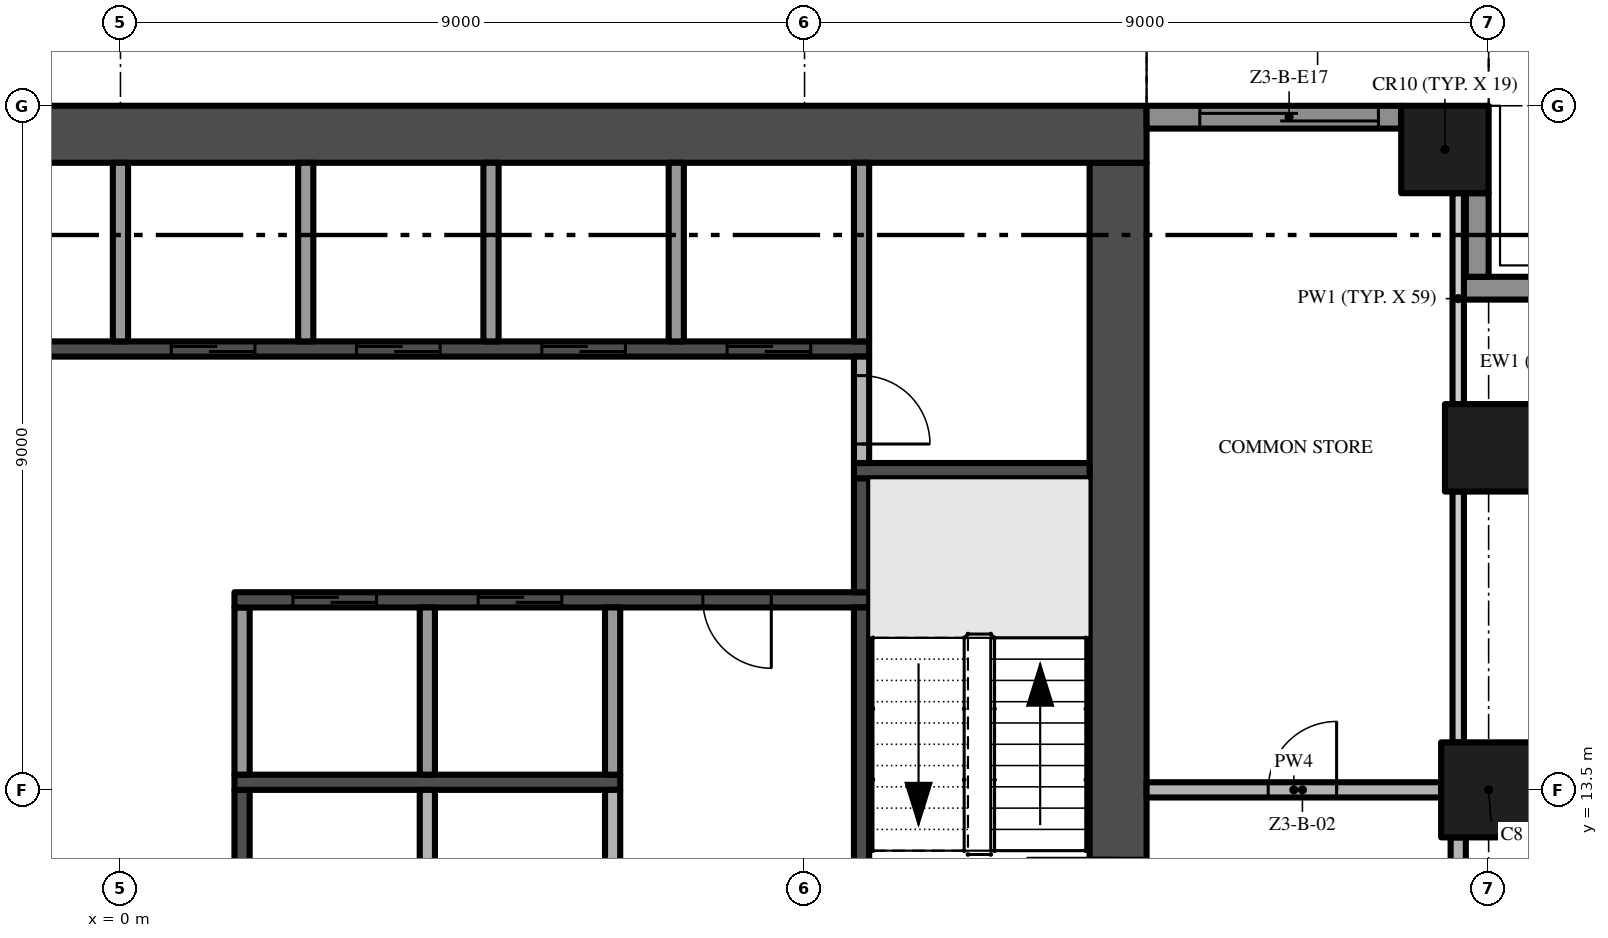
"""IFC4 building model, lengths in metres.
Left out: names, types, materials, properties, quantities, classifications, styles, units other than length and angle.
Written with IfcOpenShell. Run it as: python <this file> out.ifc"""

import sys

from ifc_helpers import new_model, si_unit, direction, frame, frame_2d, origin, origin_2d, place, context, subcontext, project, spatial, rectangle, extrude, element, fill, save


model = new_model("IFC4")
c1 = context("Model", 3, precision=1e-05, world=origin(), true_north=direction((0.0, 1.0)))
c2 = subcontext(c1, "Body", "Model", "MODEL_VIEW")
j1 = project(units=[si_unit("LENGTHUNIT", "METRE"), si_unit("PLANEANGLEUNIT", "RADIAN")], contexts=[c1])
p1 = place(None, origin())
s1 = spatial("IfcSite", under=j1, at=p1, CompositionType="ELEMENT")
p2 = place(p1, origin())
s2 = spatial("IfcBuilding", under=s1, at=p2, CompositionType="ELEMENT")
p3 = place(p2, frame((0.0, 0.0, 144.0)))
s3 = spatial("IfcBuildingStorey", under=s2, at=p3, CompositionType="ELEMENT", Elevation=144.0)
p4 = place(p3, frame((13.125, 5.25, -0.3), z_axis=(0.0, 0.0, 1.0), x_axis=(0.0, 1.0, 0.0)))
e1 = element("IfcWall", 1, at=p4, inside=s3, PredefinedType="SHEAR", context=c2, shape_type="SweptSolid", body=[
    extrude(rectangle(XDim=16.5, YDim=0.75, at=frame_2d((8.25, 0.0))), origin(), (0.0, 0.0, 1.0), 3.8),
])
p5 = place(p4, frame((6.15, 0.0, 0.3)))
e2 = element("IfcOpeningElement", 2, at=p5, cuts=e1, PredefinedType="OPENING", context=c2, shape_type="SweptSolid", body=[
    extrude(rectangle(XDim=1.2, YDim=2.2, at=frame_2d((0.6, 1.1))), frame((0.0, 0.385, 0.0), z_axis=(0.0, -1.0, 0.0), x_axis=(1.0, 0.0, 0.0)), (0.0, 0.0, 1.0), 0.77),
])
p6 = place(p3, frame((13.5, 22.125, -0.3), z_axis=(0.0, 0.0, 1.0), x_axis=(-1.0, 0.0, 0.0)))
e3 = element("IfcWall", 3, at=p6, inside=s3, PredefinedType="SHEAR", context=c2, shape_type="SweptSolid", body=[
    extrude(rectangle(XDim=27.0, YDim=0.75, at=frame_2d((13.5, 0.0))), origin(), (0.0, 0.0, 1.0), 3.8),
])
p7 = place(p3, frame((18.0, 13.5, 0.0), z_axis=(0.0, 0.0, 1.0), x_axis=(1.0, 0.0, 0.0)))
e4 = element("IfcColumn", 4, at=p7, inside=s3, PredefinedType="COLUMN", context=c2, shape_type="SweptSolid", body=[
    extrude(rectangle(XDim=1.25, YDim=1.25, at=origin_2d()), origin(), (0.0, 0.0, 1.0), 3.5),
])
for number, where, z_axis, x_axis in (
    (5, (17.425, 21.925, 0.0), (0.0, 0.0, 1.0), (1.0, 0.0, 0.0)),
    (6, (18.0, 18.0, 0.0), (0.0, 0.0, 1.0), (1.0, 0.0, 0.0)),
):
    element("IfcColumn", number, at=place(p3, frame(where, z_axis=z_axis, x_axis=x_axis)), inside=s3, PredefinedType="COLUMN", context=c2, shape_type="SweptSolid", body=[
        extrude(rectangle(XDim=1.15, YDim=1.15, at=origin_2d()), origin(), (0.0, 0.0, 1.0), 3.5),
    ])
p8 = place(p3, frame((17.6, 20.1, 0.0), z_axis=(0.0, 0.0, 1.0), x_axis=(1.0, 0.0, 0.0)))
e7 = element("IfcWall", 7, at=p8, inside=s3, PredefinedType="SOLIDWALL", context=c2, shape_type="SweptSolid", body=[
    extrude(rectangle(XDim=2.35, YDim=0.3, at=frame_2d((1.175, 0.0))), origin(), (0.0, 0.0, 1.0), 3.5),
])
p9 = place(p3, frame((17.85, 21.35, 0.0), z_axis=(0.0, 0.0, 1.0), x_axis=(0.0, -1.0, 0.0)))
e8 = element("IfcWall", 8, at=p9, inside=s3, PredefinedType="SOLIDWALL", context=c2, shape_type="SweptSolid", body=[
    extrude(rectangle(XDim=1.1, YDim=0.3, at=frame_2d((0.55, 0.0))), origin(), (0.0, 0.0, 1.0), 3.5),
])
p10 = place(p3, frame((13.5, 22.35, 0.0), z_axis=(0.0, 0.0, 1.0), x_axis=(1.0, 0.0, 0.0)))
e9 = element("IfcWall", 9, at=p10, inside=s3, PredefinedType="SOLIDWALL", context=c2, shape_type="SweptSolid", body=[
    extrude(rectangle(XDim=3.35, YDim=0.3, at=frame_2d((1.675, 0.0))), origin(), (0.0, 0.0, 1.0), 3.5),
])
p11 = place(p10, frame((0.7, 0.0, 0.0)))
e10 = element("IfcOpeningElement", 10, at=p11, cuts=e9, PredefinedType="OPENING", context=c2, shape_type="SweptSolid", body=[
    extrude(rectangle(XDim=2.35, YDim=2.4, at=frame_2d((1.175, 1.2))), frame((0.0, 0.16, 0.0), z_axis=(0.0, -1.0, 0.0), x_axis=(1.0, 0.0, 0.0)), (0.0, 0.0, 1.0), 0.32),
])
p12 = place(p3, frame((-9.85, 19.3, 0.0), z_axis=(0.0, 0.0, 1.0), x_axis=(1.0, 0.0, 0.0)))
e11 = element("IfcWall", 11, at=p12, inside=s3, PredefinedType="SHEAR", context=c2, shape_type="SweptSolid", body=[
    extrude(rectangle(XDim=19.7, YDim=0.2, at=frame_2d((9.85, 0.0))), origin(), (0.0, 0.0, 1.0), 3.5),
])
p13 = place(p12, frame((10.519, 0.0, 0.0)))
e12 = element("IfcOpeningElement", 12, at=p13, cuts=e11, PredefinedType="OPENING", context=c2, shape_type="SweptSolid", body=[
    extrude(rectangle(XDim=1.1, YDim=2.1, at=frame_2d((0.55, 1.05))), frame((0.0, 0.11, 0.0), z_axis=(0.0, -1.0, 0.0), x_axis=(1.0, 0.0, 0.0)), (0.0, 0.0, 1.0), 0.22),
])
p14 = place(p12, frame((12.956, 0.0, 0.0)))
e13 = element("IfcOpeningElement", 13, at=p14, cuts=e11, PredefinedType="OPENING", context=c2, shape_type="SweptSolid", body=[
    extrude(rectangle(XDim=1.1, YDim=2.1, at=frame_2d((0.55, 1.05))), frame((0.0, 0.11, 0.0), z_axis=(0.0, -1.0, 0.0), x_axis=(1.0, 0.0, 0.0)), (0.0, 0.0, 1.0), 0.22),
])
p15 = place(p12, frame((15.394, 0.0, 0.0)))
e14 = element("IfcOpeningElement", 14, at=p15, cuts=e11, PredefinedType="OPENING", context=c2, shape_type="SweptSolid", body=[
    extrude(rectangle(XDim=1.1, YDim=2.1, at=frame_2d((0.55, 1.05))), frame((0.0, 0.11, 0.0), z_axis=(0.0, -1.0, 0.0), x_axis=(1.0, 0.0, 0.0)), (0.0, 0.0, 1.0), 0.22),
])
p16 = place(p12, frame((17.831, 0.0, 0.0)))
e15 = element("IfcOpeningElement", 15, at=p16, cuts=e11, PredefinedType="OPENING", context=c2, shape_type="SweptSolid", body=[
    extrude(rectangle(XDim=1.1, YDim=2.1, at=frame_2d((0.55, 1.05))), frame((0.0, 0.11, 0.0), z_axis=(0.0, -1.0, 0.0), x_axis=(1.0, 0.0, 0.0)), (0.0, 0.0, 1.0), 0.22),
])
p17 = place(p12, frame((2.087, 0.0, 0.0)))
e16 = element("IfcOpeningElement", 16, at=p17, cuts=e11, PredefinedType="OPENING", context=c2, shape_type="SweptSolid", body=[
    extrude(rectangle(XDim=0.9, YDim=2.1, at=frame_2d((0.45, 1.05))), frame((0.0, 0.11, 0.0), z_axis=(0.0, -1.0, 0.0), x_axis=(1.0, 0.0, 0.0)), (0.0, 0.0, 1.0), 0.22),
])
p18 = place(p12, frame((6.963, 0.0, 0.0)))
e17 = element("IfcOpeningElement", 17, at=p18, cuts=e11, PredefinedType="OPENING", context=c2, shape_type="SweptSolid", body=[
    extrude(rectangle(XDim=0.9, YDim=2.1, at=frame_2d((0.45, 1.05))), frame((0.0, 0.11, 0.0), z_axis=(0.0, -1.0, 0.0), x_axis=(1.0, 0.0, 0.0)), (0.0, 0.0, 1.0), 0.22),
])
p19 = place(p3, frame((0.0, 19.4, 0.0), z_axis=(0.0, 0.0, 1.0), x_axis=(0.0, 1.0, 0.0)))
e18 = element("IfcWall", 18, at=p19, inside=s3, PredefinedType="PARTITIONING", context=c2, shape_type="SweptSolid", body=[
    extrude(rectangle(XDim=2.35, YDim=0.2, at=frame_2d((1.175, 0.0))), origin(), (0.0, 0.0, 1.0), 3.5),
])
p20 = place(p3, frame((1.6, 13.5, 0.0), z_axis=(0.0, 0.0, 1.0), x_axis=(0.0, -1.0, 0.0)))
e19 = element("IfcWall", 19, at=p20, inside=s3, PredefinedType="SHEAR", context=c2, shape_type="SweptSolid", body=[
    extrude(rectangle(XDim=3.5, YDim=0.2, at=frame_2d((1.75, 0.0))), origin(), (0.0, 0.0, 1.0), 3.5),
])
p21 = place(p20, frame((1.3, 0.0, 0.0)))
e20 = element("IfcOpeningElement", 20, at=p21, cuts=e19, PredefinedType="OPENING", context=c2, shape_type="SweptSolid", body=[
    extrude(rectangle(XDim=0.9, YDim=2.1, at=frame_2d((0.45, 1.05))), frame((0.0, 0.11, 0.0), z_axis=(0.0, -1.0, 0.0), x_axis=(1.0, 0.0, 0.0)), (0.0, 0.0, 1.0), 0.22),
])
p22 = place(p3, frame((1.5, 13.6, 0.0), z_axis=(0.0, 0.0, 1.0), x_axis=(1.0, 0.0, 0.0)))
e21 = element("IfcWall", 21, at=p22, inside=s3, PredefinedType="SHEAR", context=c2, shape_type="SweptSolid", body=[
    extrude(rectangle(XDim=5.075, YDim=0.2, at=frame_2d((2.538, 0.0))), origin(), (0.0, 0.0, 1.0), 3.5),
])
p23 = place(p3, frame((1.6, 13.7, 0.0), z_axis=(0.0, 0.0, 1.0), x_axis=(0.0, 1.0, 0.0)))
e22 = element("IfcWall", 22, at=p23, inside=s3, PredefinedType="PARTITIONING", context=c2, shape_type="SweptSolid", body=[
    extrude(rectangle(XDim=2.2, YDim=0.2, at=frame_2d((1.1, 0.0))), origin(), (0.0, 0.0, 1.0), 3.5),
])
p24 = place(p3, frame((9.85, 16.0, 0.0), z_axis=(0.0, 0.0, 1.0), x_axis=(-1.0, 0.0, 0.0)))
e23 = element("IfcWall", 23, at=p24, inside=s3, PredefinedType="SHEAR", context=c2, shape_type="SweptSolid", body=[
    extrude(rectangle(XDim=8.35, YDim=0.2, at=frame_2d((4.175, 0.0))), origin(), (0.0, 0.0, 1.0), 3.5),
])
p25 = place(p24, frame((6.481, 0.0, 0.0)))
e24 = element("IfcOpeningElement", 24, at=p25, cuts=e23, PredefinedType="OPENING", context=c2, shape_type="SweptSolid", body=[
    extrude(rectangle(XDim=1.1, YDim=2.1, at=frame_2d((0.55, 1.05))), frame((0.0, 0.11, 0.0), z_axis=(0.0, -1.0, 0.0), x_axis=(1.0, 0.0, 0.0)), (0.0, 0.0, 1.0), 0.22),
])
p26 = place(p24, frame((4.044, 0.0, 0.0)))
e25 = element("IfcOpeningElement", 25, at=p26, cuts=e23, PredefinedType="OPENING", context=c2, shape_type="SweptSolid", body=[
    extrude(rectangle(XDim=1.1, YDim=2.1, at=frame_2d((0.55, 1.05))), frame((0.0, 0.11, 0.0), z_axis=(0.0, -1.0, 0.0), x_axis=(1.0, 0.0, 0.0)), (0.0, 0.0, 1.0), 0.22),
])
p27 = place(p24, frame((1.288, 0.0, 0.0)))
e26 = element("IfcOpeningElement", 26, at=p27, cuts=e23, PredefinedType="OPENING", context=c2, shape_type="SweptSolid", body=[
    extrude(rectangle(XDim=0.9, YDim=2.1, at=frame_2d((0.45, 1.05))), frame((0.0, 0.11, 0.0), z_axis=(0.0, -1.0, 0.0), x_axis=(1.0, 0.0, 0.0)), (0.0, 0.0, 1.0), 0.22),
])
p28 = place(p3, frame((2.438, 19.4, 0.0), z_axis=(0.0, 0.0, 1.0), x_axis=(0.0, 1.0, 0.0)))
e27 = element("IfcWall", 27, at=p28, inside=s3, PredefinedType="PARTITIONING", context=c2, shape_type="SweptSolid", body=[
    extrude(rectangle(XDim=2.35, YDim=0.2, at=frame_2d((1.175, 0.0))), origin(), (0.0, 0.0, 1.0), 3.5),
])
p29 = place(p3, frame((4.037, 10.0, 0.0), z_axis=(0.0, 0.0, 1.0), x_axis=(0.0, 1.0, 0.0)))
e28 = element("IfcWall", 28, at=p29, inside=s3, PredefinedType="PARTITIONING", context=c2, shape_type="SweptSolid", body=[
    extrude(rectangle(XDim=3.5, YDim=0.2, at=frame_2d((1.75, 0.0))), origin(), (0.0, 0.0, 1.0), 3.5),
])
p30 = place(p3, frame((4.037, 13.7, 0.0), z_axis=(0.0, 0.0, 1.0), x_axis=(0.0, 1.0, 0.0)))
e29 = element("IfcWall", 29, at=p30, inside=s3, PredefinedType="PARTITIONING", context=c2, shape_type="SweptSolid", body=[
    extrude(rectangle(XDim=2.2, YDim=0.2, at=frame_2d((1.1, 0.0))), origin(), (0.0, 0.0, 1.0), 3.5),
])
p31 = place(p3, frame((4.875, 19.4, 0.0), z_axis=(0.0, 0.0, 1.0), x_axis=(0.0, 1.0, 0.0)))
e30 = element("IfcWall", 30, at=p31, inside=s3, PredefinedType="PARTITIONING", context=c2, shape_type="SweptSolid", body=[
    extrude(rectangle(XDim=2.35, YDim=0.2, at=frame_2d((1.175, 0.0))), origin(), (0.0, 0.0, 1.0), 3.5),
])
p32 = place(p3, frame((6.475, 12.3, 0.0), z_axis=(0.0, 0.0, 1.0), x_axis=(0.0, 1.0, 0.0)))
e31 = element("IfcWall", 31, at=p32, inside=s3, PredefinedType="PARTITIONING", context=c2, shape_type="SweptSolid", body=[
    extrude(rectangle(XDim=1.2, YDim=0.2, at=frame_2d((0.6, 0.0))), origin(), (0.0, 0.0, 1.0), 3.5),
])
p33 = place(p3, frame((6.475, 13.7, 0.0), z_axis=(0.0, 0.0, 1.0), x_axis=(0.0, 1.0, 0.0)))
e32 = element("IfcWall", 32, at=p33, inside=s3, PredefinedType="PARTITIONING", context=c2, shape_type="SweptSolid", body=[
    extrude(rectangle(XDim=2.2, YDim=0.2, at=frame_2d((1.1, 0.0))), origin(), (0.0, 0.0, 1.0), 3.5),
])
p34 = place(p3, frame((7.312, 19.4, 0.0), z_axis=(0.0, 0.0, 1.0), x_axis=(0.0, 1.0, 0.0)))
e33 = element("IfcWall", 33, at=p34, inside=s3, PredefinedType="PARTITIONING", context=c2, shape_type="SweptSolid", body=[
    extrude(rectangle(XDim=2.35, YDim=0.2, at=frame_2d((1.175, 0.0))), origin(), (0.0, 0.0, 1.0), 3.5),
])
p35 = place(p3, frame((9.75, 12.3, 0.0), z_axis=(0.0, 0.0, 1.0), x_axis=(0.0, 1.0, 0.0)))
e34 = element("IfcWall", 34, at=p35, inside=s3, PredefinedType="SHEAR", context=c2, shape_type="SweptSolid", body=[
    extrude(rectangle(XDim=3.6, YDim=0.2, at=frame_2d((1.8, 0.0))), origin(), (0.0, 0.0, 1.0), 3.5),
])
p36 = place(p3, frame((9.75, 16.1, 0.0), z_axis=(0.0, 0.0, 1.0), x_axis=(0.0, 1.0, 0.0)))
e35 = element("IfcWall", 35, at=p36, inside=s3, PredefinedType="SHEAR", context=c2, shape_type="SweptSolid", body=[
    extrude(rectangle(XDim=1.5, YDim=0.2, at=frame_2d((0.75, 0.0))), origin(), (0.0, 0.0, 1.0), 3.5),
])
p37 = place(p3, frame((9.65, 17.7, 0.0), z_axis=(0.0, 0.0, 1.0), x_axis=(1.0, 0.0, 0.0)))
e36 = element("IfcWall", 36, at=p37, inside=s3, PredefinedType="SHEAR", context=c2, shape_type="SweptSolid", body=[
    extrude(rectangle(XDim=3.1, YDim=0.2, at=frame_2d((1.55, 0.0))), origin(), (0.0, 0.0, 1.0), 3.5),
])
p38 = place(p3, frame((9.75, 19.2, 0.0), z_axis=(0.0, 0.0, 1.0), x_axis=(0.0, -1.0, 0.0)))
e37 = element("IfcWall", 37, at=p38, inside=s3, PredefinedType="PARTITIONING", context=c2, shape_type="SweptSolid", body=[
    extrude(rectangle(XDim=1.4, YDim=0.2, at=frame_2d((0.7, 0.0))), origin(), (0.0, 0.0, 1.0), 3.5),
])
p39 = place(p38, frame((0.25, 0.0, 0.0)))
e38 = element("IfcOpeningElement", 38, at=p39, cuts=e37, PredefinedType="OPENING", context=c2, shape_type="SweptSolid", body=[
    extrude(rectangle(XDim=0.9, YDim=2.1, at=frame_2d((0.45, 1.05))), frame((0.0, 0.11, 0.0), z_axis=(0.0, -1.0, 0.0), x_axis=(1.0, 0.0, 0.0)), (0.0, 0.0, 1.0), 0.22),
])
p40 = place(p3, frame((9.75, 19.4, 0.0), z_axis=(0.0, 0.0, 1.0), x_axis=(0.0, 1.0, 0.0)))
e39 = element("IfcWall", 39, at=p40, inside=s3, PredefinedType="PARTITIONING", context=c2, shape_type="SweptSolid", body=[
    extrude(rectangle(XDim=2.35, YDim=0.2, at=frame_2d((1.175, 0.0))), origin(), (0.0, 0.0, 1.0), 3.5),
])
p41 = place(p3, frame((13.5, 13.5, 0.0), z_axis=(0.0, 0.0, 1.0), x_axis=(1.0, 0.0, 0.0)))
e40 = element("IfcWall", 40, at=p41, inside=s3, PredefinedType="PARTITIONING", context=c2, shape_type="SweptSolid", body=[
    extrude(rectangle(XDim=3.875, YDim=0.2, at=frame_2d((1.938, 0.0))), origin(), (0.0, 0.0, 1.0), 3.5),
])
p42 = place(p41, frame((1.6, 0.0, 0.0)))
e41 = element("IfcOpeningElement", 41, at=p42, cuts=e40, PredefinedType="OPENING", context=c2, shape_type="SweptSolid", body=[
    extrude(rectangle(XDim=0.9, YDim=2.1, at=frame_2d((0.45, 1.05))), frame((0.0, 0.11, 0.0), z_axis=(0.0, -1.0, 0.0), x_axis=(1.0, 0.0, 0.0)), (0.0, 0.0, 1.0), 0.22),
])
p43 = place(p3, frame((17.6, 12.875, 0.0), z_axis=(0.0, 0.0, 1.0), x_axis=(0.0, -1.0, 0.0)))
e42 = element("IfcWall", 42, at=p43, inside=s3, PredefinedType="PARTITIONING", context=c2, shape_type="SweptSolid", body=[
    extrude(rectangle(XDim=7.75, YDim=0.2, at=frame_2d((3.875, 0.0))), origin(), (0.0, 0.0, 1.0), 3.5),
])
p44 = place(p43, frame((5.55, 0.0, 0.0)))
e43 = element("IfcOpeningElement", 43, at=p44, cuts=e42, PredefinedType="OPENING", context=c2, shape_type="SweptSolid", body=[
    extrude(rectangle(XDim=1.2, YDim=2.4, at=frame_2d((0.6, 1.2))), frame((0.0, 0.11, 0.0), z_axis=(0.0, -1.0, 0.0), x_axis=(1.0, 0.0, 0.0)), (0.0, 0.0, 1.0), 0.22),
])
p45 = place(p3, frame((17.6, 14.125, 0.0), z_axis=(0.0, 0.0, 1.0), x_axis=(0.0, 1.0, 0.0)))
e44 = element("IfcWall", 44, at=p45, inside=s3, PredefinedType="PARTITIONING", context=c2, shape_type="SweptSolid", body=[
    extrude(rectangle(XDim=3.3, YDim=0.15, at=frame_2d((1.65, 0.0))), origin(), (0.0, 0.0, 1.0), 3.5),
])
p46 = place(p3, frame((17.6, 18.575, 0.0), z_axis=(0.0, 0.0, 1.0), x_axis=(0.0, 1.0, 0.0)))
e45 = element("IfcWall", 45, at=p46, inside=s3, PredefinedType="PARTITIONING", context=c2, shape_type="SweptSolid", body=[
    extrude(rectangle(XDim=2.775, YDim=0.15, at=frame_2d((1.387, 0.0))), origin(), (0.0, 0.0, 1.0), 3.5),
])
p47 = place(p11, origin())
e46 = element("IfcDoor", 46, at=p47, inside=s3, OperationType="SINGLE_SWING_LEFT", PredefinedType="DOOR", context=c2, shape_type="SweptSolid", body=[
    extrude(rectangle(XDim=2.35, YDim=2.4, at=frame_2d((1.175, 1.2))), frame((0.0, 0.025, 0.0), z_axis=(0.0, -1.0, 0.0), x_axis=(1.0, 0.0, 0.0)), (0.0, 0.0, 1.0), 0.05),
])
fill(e10, e46)
p48 = place(p13, origin())
e47 = element("IfcDoor", 47, at=p48, inside=s3, OperationType="SLIDING_TO_RIGHT", PredefinedType="DOOR", context=c2, shape_type="SweptSolid", body=[
    extrude(rectangle(XDim=1.1, YDim=2.1, at=frame_2d((0.55, 1.05))), frame((0.0, 0.025, 0.0), z_axis=(0.0, -1.0, 0.0), x_axis=(1.0, 0.0, 0.0)), (0.0, 0.0, 1.0), 0.05),
])
fill(e12, e47)
p49 = place(p14, origin())
e48 = element("IfcDoor", 48, at=p49, inside=s3, OperationType="SLIDING_TO_RIGHT", PredefinedType="DOOR", context=c2, shape_type="SweptSolid", body=[
    extrude(rectangle(XDim=1.1, YDim=2.1, at=frame_2d((0.55, 1.05))), frame((0.0, 0.025, 0.0), z_axis=(0.0, -1.0, 0.0), x_axis=(1.0, 0.0, 0.0)), (0.0, 0.0, 1.0), 0.05),
])
fill(e13, e48)
p50 = place(p15, origin())
e49 = element("IfcDoor", 49, at=p50, inside=s3, OperationType="SLIDING_TO_RIGHT", PredefinedType="DOOR", context=c2, shape_type="SweptSolid", body=[
    extrude(rectangle(XDim=1.1, YDim=2.1, at=frame_2d((0.55, 1.05))), frame((0.0, 0.025, 0.0), z_axis=(0.0, -1.0, 0.0), x_axis=(1.0, 0.0, 0.0)), (0.0, 0.0, 1.0), 0.05),
])
fill(e14, e49)
p51 = place(p16, origin())
e50 = element("IfcDoor", 50, at=p51, inside=s3, OperationType="SLIDING_TO_RIGHT", PredefinedType="DOOR", context=c2, shape_type="SweptSolid", body=[
    extrude(rectangle(XDim=1.1, YDim=2.1, at=frame_2d((0.55, 1.05))), frame((0.0, 0.025, 0.0), z_axis=(0.0, -1.0, 0.0), x_axis=(1.0, 0.0, 0.0)), (0.0, 0.0, 1.0), 0.05),
])
fill(e15, e50)
p52 = place(p25, origin())
e51 = element("IfcDoor", 51, at=p52, inside=s3, OperationType="SLIDING_TO_RIGHT", PredefinedType="DOOR", context=c2, shape_type="SweptSolid", body=[
    extrude(rectangle(XDim=1.1, YDim=2.1, at=frame_2d((0.55, 1.05))), frame((0.0, 0.025, 0.0), z_axis=(0.0, -1.0, 0.0), x_axis=(1.0, 0.0, 0.0)), (0.0, 0.0, 1.0), 0.05),
])
fill(e24, e51)
p53 = place(p26, origin())
e52 = element("IfcDoor", 52, at=p53, inside=s3, OperationType="SLIDING_TO_RIGHT", PredefinedType="DOOR", context=c2, shape_type="SweptSolid", body=[
    extrude(rectangle(XDim=1.1, YDim=2.1, at=frame_2d((0.55, 1.05))), frame((0.0, 0.025, 0.0), z_axis=(0.0, -1.0, 0.0), x_axis=(1.0, 0.0, 0.0)), (0.0, 0.0, 1.0), 0.05),
])
fill(e25, e52)
p54 = place(p27, origin())
e53 = element("IfcDoor", 53, at=p54, inside=s3, OperationType="SINGLE_SWING_LEFT", PredefinedType="DOOR", context=c2, shape_type="SweptSolid", body=[
    extrude(rectangle(XDim=0.9, YDim=2.1, at=frame_2d((0.45, 1.05))), frame((0.0, 0.025, 0.0), z_axis=(0.0, -1.0, 0.0), x_axis=(1.0, 0.0, 0.0)), (0.0, 0.0, 1.0), 0.05),
])
fill(e26, e53)
p55 = place(p39, origin())
e54 = element("IfcDoor", 54, at=p55, inside=s3, OperationType="SINGLE_SWING_RIGHT", PredefinedType="DOOR", context=c2, shape_type="SweptSolid", body=[
    extrude(rectangle(XDim=0.9, YDim=2.1, at=frame_2d((0.45, 1.05))), frame((0.0, 0.025, 0.0), z_axis=(0.0, -1.0, 0.0), x_axis=(1.0, 0.0, 0.0)), (0.0, 0.0, 1.0), 0.05),
])
fill(e38, e54)
p56 = place(p42, origin())
e55 = element("IfcDoor", 55, at=p56, inside=s3, OperationType="SINGLE_SWING_RIGHT", PredefinedType="DOOR", context=c2, shape_type="SweptSolid", body=[
    extrude(rectangle(XDim=0.9, YDim=2.1, at=frame_2d((0.45, 1.05))), frame((0.0, 0.025, 0.0), z_axis=(0.0, -1.0, 0.0), x_axis=(1.0, 0.0, 0.0)), (0.0, 0.0, 1.0), 0.05),
])
fill(e41, e55)
save(model, sys.argv[1])
